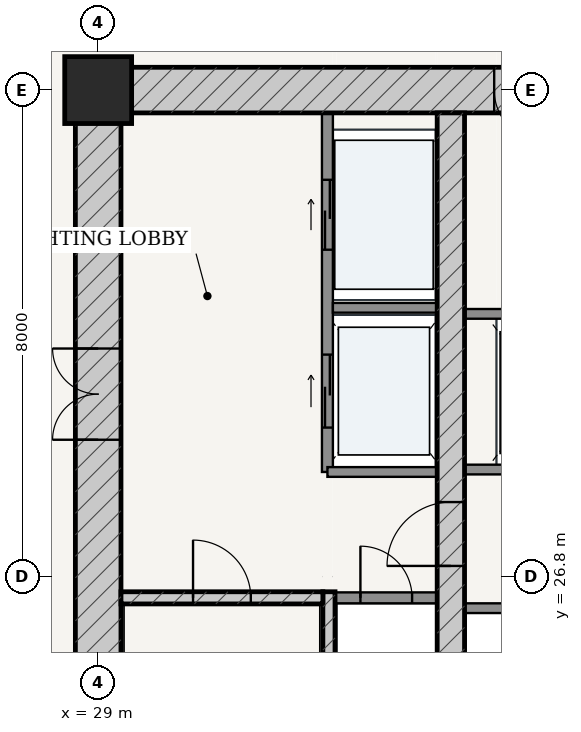
"""IFC4 building model, lengths in metres.
Left out: names, types, materials, properties, quantities, classifications, styles, units other than length and angle.
Written with IfcOpenShell. Run it as: python <this file> out.ifc"""

import sys

from ifc_helpers import new_model, si_unit, direction, frame, frame_2d, origin, origin_2d, place, context, subcontext, project, spatial, rectangle, extrude, source, transform, mapped, element, fill, save


model = new_model("IFC4")
c1 = context("Model", 3, precision=1e-05, world=origin(), true_north=direction((-0.2419218956, 0.970295726276)))
c2 = subcontext(c1, "Body", "Model", "MODEL_VIEW")
j1 = project(units=[si_unit("LENGTHUNIT", "METRE"), si_unit("PLANEANGLEUNIT", "RADIAN")], contexts=[c1])
p1 = place(None, origin())
s1 = spatial("IfcSite", under=j1, at=p1, CompositionType="ELEMENT")
p2 = place(p1, origin())
s2 = spatial("IfcBuilding", under=s1, at=p2, CompositionType="ELEMENT")
p3 = place(p2, frame((0.0, 0.0, 45.6)))
s3 = spatial("IfcBuildingStorey", under=s2, at=p3, CompositionType="ELEMENT", Elevation=45.6)
p4 = place(p3, frame((29.0, 34.8, 0.0), z_axis=(0.0, 0.0, 1.0), x_axis=(1.0, 0.0, 0.0)))
e1 = element("IfcColumn", 1, at=p4, inside=s3, PredefinedType="COLUMN", context=c2, shape_type="SweptSolid", body=[
    extrude(rectangle(XDim=1.1, YDim=1.1, at=origin_2d()), origin(), (0.0, 0.0, 1.0), 3.6),
])
p5 = place(p3, frame((28.625, 34.8, 0.0), z_axis=(0.0, 0.0, 1.0), x_axis=(1.0, 0.0, 0.0)))
e2 = element("IfcWall", 2, at=p5, inside=s3, PredefinedType="SHEAR", context=c2, shape_type="SweptSolid", body=[
    extrude(rectangle(XDim=18.75, YDim=0.75, at=frame_2d((9.375, 0.0))), origin(), (0.0, 0.0, 1.0), 3.32),
])
p6 = place(p5, frame((6.887, 0.0, 0.0)))
e3 = element("IfcOpeningElement", 3, at=p6, cuts=e2, PredefinedType="OPENING", context=c2, shape_type="SweptSolid", body=[
    extrude(rectangle(XDim=0.85, YDim=2.1, at=frame_2d((0.425, 1.05))), frame((0.0, 0.385, 0.0), z_axis=(0.0, -1.0, 0.0), x_axis=(1.0, 0.0, 0.0)), (0.0, 0.0, 1.0), 0.77),
])
p7 = place(p5, frame((8.945, 0.0, 0.0)))
e4 = element("IfcOpeningElement", 4, at=p7, cuts=e2, PredefinedType="OPENING", context=c2, shape_type="SweptSolid", body=[
    extrude(rectangle(XDim=0.86, YDim=2.1, at=frame_2d((0.43, 1.05))), frame((0.0, 0.385, 0.0), z_axis=(0.0, -1.0, 0.0), x_axis=(1.0, 0.0, 0.0)), (0.0, 0.0, 1.0), 0.77),
])
p8 = place(p5, frame((11.012, 0.0, 0.0)))
e5 = element("IfcOpeningElement", 5, at=p8, cuts=e2, PredefinedType="OPENING", context=c2, shape_type="SweptSolid", body=[
    extrude(rectangle(XDim=0.85, YDim=2.1, at=frame_2d((0.425, 1.05))), frame((0.0, 0.385, 0.0), z_axis=(0.0, -1.0, 0.0), x_axis=(1.0, 0.0, 0.0)), (0.0, 0.0, 1.0), 0.77),
])
p9 = place(p3, frame((29.0, 19.175, 0.0), z_axis=(0.0, 0.0, 1.0), x_axis=(0.0, 1.0, 0.0)))
e6 = element("IfcWall", 6, at=p9, inside=s3, PredefinedType="SHEAR", context=c2, shape_type="SweptSolid", body=[
    extrude(rectangle(XDim=15.25, YDim=0.75, at=frame_2d((7.625, 0.0))), origin(), (0.0, 0.0, 1.0), 3.32),
])
p10 = place(p9, frame((9.875, 0.0, 0.0)))
e7 = element("IfcOpeningElement", 7, at=p10, cuts=e6, PredefinedType="OPENING", context=c2, shape_type="SweptSolid", body=[
    extrude(rectangle(XDim=1.5, YDim=2.2, at=frame_2d((0.75, 1.1))), frame((0.0, 0.385, 0.0), z_axis=(0.0, -1.0, 0.0), x_axis=(1.0, 0.0, 0.0)), (0.0, 0.0, 1.0), 0.77),
])
p11 = place(p3, frame((32.795, 19.175, 0.0), z_axis=(0.0, 0.0, 1.0), x_axis=(0.0, 1.0, 0.0)))
e8 = element("IfcWall", 8, at=p11, inside=s3, PredefinedType="SOLIDWALL", context=c2, shape_type="SweptSolid", body=[
    extrude(rectangle(XDim=7.375, YDim=0.2, at=frame_2d((3.688, 0.0))), origin(), (0.0, 0.0, 1.0), 3.32),
])
p12 = place(p3, frame((29.375, 26.45, 0.0), z_axis=(0.0, 0.0, 1.0), x_axis=(1.0, 0.0, 0.0)))
e9 = element("IfcWall", 9, at=p12, inside=s3, PredefinedType="SOLIDWALL", context=c2, shape_type="SweptSolid", body=[
    extrude(rectangle(XDim=3.32, YDim=0.2, at=frame_2d((1.66, 0.0))), origin(), (0.0, 0.0, 1.0), 3.32),
])
p13 = place(p12, frame((1.185, 0.0, 0.0)))
e10 = element("IfcOpeningElement", 10, at=p13, cuts=e9, PredefinedType="OPENING", context=c2, shape_type="SweptSolid", body=[
    extrude(rectangle(XDim=0.95, YDim=2.15, at=frame_2d((0.475, 1.075))), frame((0.0, 0.11, 0.0), z_axis=(0.0, -1.0, 0.0), x_axis=(1.0, 0.0, 0.0)), (0.0, 0.0, 1.0), 0.22),
])
p14 = place(p3, frame((34.8, 19.175, 0.0), z_axis=(0.0, 0.0, 1.0), x_axis=(0.0, 1.0, 0.0)))
e11 = element("IfcWall", 11, at=p14, inside=s3, PredefinedType="SHEAR", context=c2, shape_type="SweptSolid", body=[
    extrude(rectangle(XDim=15.25, YDim=0.45, at=frame_2d((7.625, 0.0))), origin(), (0.0, 0.0, 1.0), 3.32),
])
p15 = place(p14, frame((7.8, 0.0, 0.0)))
e12 = element("IfcOpeningElement", 12, at=p15, cuts=e11, PredefinedType="OPENING", context=c2, shape_type="SweptSolid", body=[
    extrude(rectangle(XDim=1.05, YDim=2.15, at=frame_2d((0.525, 1.075))), frame((0.0, 0.235, 0.0), z_axis=(0.0, -1.0, 0.0), x_axis=(1.0, 0.0, 0.0)), (0.0, 0.0, 1.0), 0.47),
])
p16 = place(p3, frame((32.9, 26.45, 0.0), z_axis=(0.0, 0.0, 1.0), x_axis=(1.0, 0.0, 0.0)))
e13 = element("IfcWall", 13, at=p16, inside=s3, PredefinedType="PARTITIONING", context=c2, shape_type="SweptSolid", body=[
    extrude(rectangle(XDim=1.675, YDim=0.18, at=frame_2d((0.837, 0.0))), origin(), (0.0, 0.0, 1.0), 3.32),
])
p17 = place(p16, frame((0.413, 0.0, 0.0)))
e14 = element("IfcOpeningElement", 14, at=p17, cuts=e13, PredefinedType="OPENING", context=c2, shape_type="SweptSolid", body=[
    extrude(rectangle(XDim=0.85, YDim=2.1, at=frame_2d((0.425, 1.05))), frame((0.0, 0.1, 0.0), z_axis=(0.0, -1.0, 0.0), x_axis=(1.0, 0.0, 0.0)), (0.0, 0.0, 1.0), 0.2),
])
p18 = place(p3, frame((32.77, 28.52, 0.0), z_axis=(0.0, 0.0, 1.0), x_axis=(0.0, 1.0, 0.0)))
e15 = element("IfcWall", 15, at=p18, inside=s3, PredefinedType="PARTITIONING", context=c2, shape_type="SweptSolid", body=[
    extrude(rectangle(XDim=5.905, YDim=0.18, at=frame_2d((2.953, 0.0))), origin(), (0.0, 0.0, 1.0), 3.32),
])
p19 = place(p18, frame((3.655, 0.0, 0.0)))
e16 = element("IfcOpeningElement", 16, at=p19, cuts=e15, PredefinedType="OPENING", context=c2, shape_type="SweptSolid", body=[
    extrude(rectangle(XDim=1.15, YDim=2.2, at=frame_2d((0.575, 1.1))), frame((0.0, 0.1, 0.0), z_axis=(0.0, -1.0, 0.0), x_axis=(1.0, 0.0, 0.0)), (0.0, 0.0, 1.0), 0.2),
])
p20 = place(p18, frame((0.73, 0.0, 0.0)))
e17 = element("IfcOpeningElement", 17, at=p20, cuts=e15, PredefinedType="OPENING", context=c2, shape_type="SweptSolid", body=[
    extrude(rectangle(XDim=1.2, YDim=2.25, at=frame_2d((0.6, 1.125))), frame((0.0, 0.1, 0.0), z_axis=(0.0, -1.0, 0.0), x_axis=(1.0, 0.0, 0.0)), (0.0, 0.0, 1.0), 0.2),
])
p21 = place(p3, frame((32.86, 31.22, 0.0), z_axis=(0.0, 0.0, 1.0), x_axis=(1.0, 0.0, 0.0)))
e18 = element("IfcWall", 18, at=p21, inside=s3, PredefinedType="PARTITIONING", context=c2, shape_type="SweptSolid", body=[
    extrude(rectangle(XDim=1.715, YDim=0.16, at=frame_2d((0.857, 0.0))), origin(), (0.0, 0.0, 1.0), 3.32),
])
p22 = place(p3, frame((32.77, 28.52, 0.0), z_axis=(0.0, 0.0, 1.0), x_axis=(1.0, 0.0, 0.0)))
e19 = element("IfcWall", 19, at=p22, inside=s3, PredefinedType="PARTITIONING", context=c2, shape_type="SweptSolid", body=[
    extrude(rectangle(XDim=1.805, YDim=0.16, at=frame_2d((0.902, 0.0))), origin(), (0.0, 0.0, 1.0), 3.32),
])
p23 = place(p3, frame((35.025, 28.56, 0.0), z_axis=(0.0, 0.0, 1.0), x_axis=(1.0, 0.0, 0.0)))
e20 = element("IfcWall", 20, at=p23, inside=s3, PredefinedType="PARTITIONING", context=c2, shape_type="SweptSolid", body=[
    extrude(rectangle(XDim=5.95, YDim=0.16, at=frame_2d((2.975, 0.0))), origin(), (0.0, 0.0, 1.0), 3.32),
])
p24 = place(p23, frame((0.76, 0.0, 0.0)))
e21 = element("IfcOpeningElement", 21, at=p24, cuts=e20, PredefinedType="OPENING", context=c2, shape_type="SweptSolid", body=[
    extrude(rectangle(XDim=1.1, YDim=2.2, at=frame_2d((0.55, 1.1))), frame((0.0, 0.09, 0.0), z_axis=(0.0, -1.0, 0.0), x_axis=(1.0, 0.0, 0.0)), (0.0, 0.0, 1.0), 0.18),
])
p25 = place(p23, frame((2.425, 0.0, 0.0)))
e22 = element("IfcOpeningElement", 22, at=p25, cuts=e20, PredefinedType="OPENING", context=c2, shape_type="SweptSolid", body=[
    extrude(rectangle(XDim=1.1, YDim=2.2, at=frame_2d((0.55, 1.1))), frame((0.0, 0.09, 0.0), z_axis=(0.0, -1.0, 0.0), x_axis=(1.0, 0.0, 0.0)), (0.0, 0.0, 1.0), 0.18),
])
p26 = place(p23, frame((4.09, 0.0, 0.0)))
e23 = element("IfcOpeningElement", 23, at=p26, cuts=e20, PredefinedType="OPENING", context=c2, shape_type="SweptSolid", body=[
    extrude(rectangle(XDim=1.1, YDim=2.2, at=frame_2d((0.55, 1.1))), frame((0.0, 0.09, 0.0), z_axis=(0.0, -1.0, 0.0), x_axis=(1.0, 0.0, 0.0)), (0.0, 0.0, 1.0), 0.18),
])
for number, where, z_axis, x_axis in (
    (24, (35.025, 31.12, 0.0), (0.0, 0.0, 1.0), (1.0, 0.0, 0.0)),
    (25, (35.025, 26.28, 0.0), (0.0, 0.0, 1.0), (1.0, 0.0, 0.0)),
):
    element("IfcWall", number, at=place(p3, frame(where, z_axis=z_axis, x_axis=x_axis)), inside=s3, PredefinedType="PARTITIONING", context=c2, shape_type="SweptSolid", body=[
        extrude(rectangle(XDim=5.95, YDim=0.16, at=frame_2d((2.975, 0.0))), origin(), (0.0, 0.0, 1.0), 3.32),
    ])
m1 = source(origin(), c2, "Body", "SweptSolid", [
    extrude(rectangle(XDim=1.5, YDim=2.2, at=frame_2d((0.75, 1.1))), frame((0.0, 0.025, 0.0), z_axis=(0.0, -1.0, 0.0), x_axis=(1.0, 0.0, 0.0)), (0.0, 0.0, 1.0), 0.05),
])
p27 = place(p10, origin())
e26 = element("IfcDoor", 26, at=p27, inside=s3, OperationType="DOUBLE_DOOR_SINGLE_SWING", PredefinedType="DOOR", context=c2, shape_type="MappedRepresentation", body=[
    mapped(m1, transform((0.0, 0.0, 0.0), scale=1.0)),
])
fill(e7, e26)
m2 = source(origin(), c2, "Body", "SweptSolid", [
    extrude(rectangle(XDim=1.05, YDim=2.15, at=frame_2d((0.525, 1.075))), frame((0.0, 0.025, 0.0), z_axis=(0.0, -1.0, 0.0), x_axis=(1.0, 0.0, 0.0)), (0.0, 0.0, 1.0), 0.05),
])
p28 = place(p15, origin())
e27 = element("IfcDoor", 27, at=p28, inside=s3, OperationType="SINGLE_SWING_LEFT", PredefinedType="DOOR", context=c2, shape_type="MappedRepresentation", body=[
    mapped(m2, transform((0.0, 0.0, 0.0), scale=1.0)),
])
fill(e12, e27)
m3 = source(origin(), c2, "Body", "SweptSolid", [
    extrude(rectangle(XDim=0.95, YDim=2.15, at=frame_2d((0.475, 1.075))), frame((0.0, 0.025, 0.0), z_axis=(0.0, -1.0, 0.0), x_axis=(1.0, 0.0, 0.0)), (0.0, 0.0, 1.0), 0.05),
])
p29 = place(p13, origin())
e28 = element("IfcDoor", 28, at=p29, inside=s3, OperationType="SINGLE_SWING_LEFT", PredefinedType="DOOR", context=c2, shape_type="MappedRepresentation", body=[
    mapped(m3, transform((0.0, 0.0, 0.0), scale=1.0)),
])
fill(e10, e28)
m4 = source(origin(), c2, "Body", "SweptSolid", [
    extrude(rectangle(XDim=0.85, YDim=2.1, at=frame_2d((0.425, 1.05))), frame((0.0, 0.025, 0.0), z_axis=(0.0, -1.0, 0.0), x_axis=(1.0, 0.0, 0.0)), (0.0, 0.0, 1.0), 0.05),
])
p30 = place(p17, origin())
e29 = element("IfcDoor", 29, at=p30, inside=s3, OperationType="SINGLE_SWING_LEFT", PredefinedType="DOOR", context=c2, shape_type="MappedRepresentation", body=[
    mapped(m4, transform((0.0, 0.0, 0.0), scale=1.0)),
])
fill(e14, e29)
p31 = place(p6, frame((0.85, 0.0, 0.0), z_axis=(0.0, 0.0, 1.0), x_axis=(-1.0, 0.0, 0.0)))
e30 = element("IfcDoor", 30, at=p31, inside=s3, OperationType="SINGLE_SWING_LEFT", PredefinedType="DOOR", context=c2, shape_type="MappedRepresentation", body=[
    mapped(m4, transform((0.0, 0.0, 0.0), scale=1.0)),
])
fill(e3, e30)
m5 = source(origin(), c2, "Body", "SweptSolid", [
    extrude(rectangle(XDim=1.15, YDim=2.2, at=frame_2d((0.575, 1.1))), frame((0.0, 0.025, 0.0), z_axis=(0.0, -1.0, 0.0), x_axis=(1.0, 0.0, 0.0)), (0.0, 0.0, 1.0), 0.05),
])
p32 = place(p19, origin())
e31 = element("IfcDoor", 31, at=p32, inside=s3, OperationType="DOUBLE_DOOR_SLIDING", PredefinedType="DOOR", context=c2, shape_type="MappedRepresentation", body=[
    mapped(m5, transform((0.0, 0.0, 0.0), scale=1.0)),
])
fill(e16, e31)
m6 = source(origin(), c2, "Body", "SweptSolid", [
    extrude(rectangle(XDim=1.2, YDim=2.25, at=frame_2d((0.6, 1.125))), frame((0.0, 0.025, 0.0), z_axis=(0.0, -1.0, 0.0), x_axis=(1.0, 0.0, 0.0)), (0.0, 0.0, 1.0), 0.05),
])
p33 = place(p20, origin())
e32 = element("IfcDoor", 32, at=p33, inside=s3, OperationType="DOUBLE_DOOR_SLIDING", PredefinedType="DOOR", context=c2, shape_type="MappedRepresentation", body=[
    mapped(m6, transform((0.0, 0.0, 0.0), scale=1.0)),
])
fill(e17, e32)
save(model, sys.argv[1])
